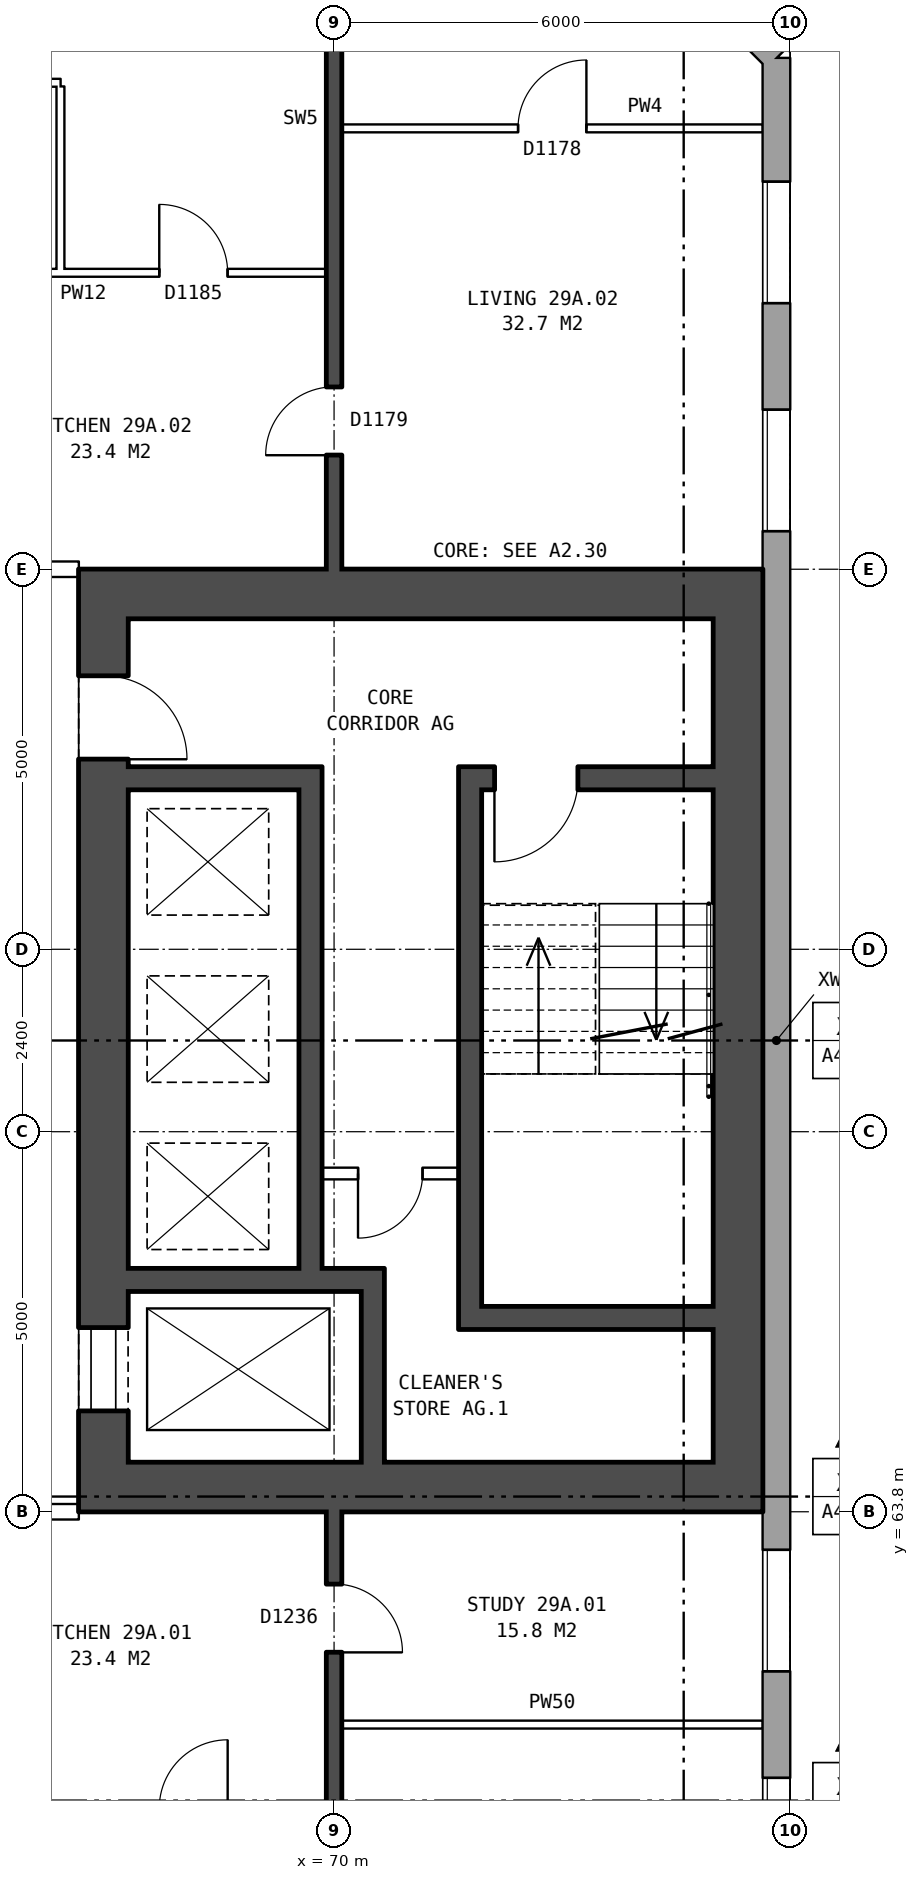
"""IFC4 building model, lengths in metres.
Left out: names, types, materials, properties, quantities, classifications, styles, units other than length and angle.
Written with IfcOpenShell. Run it as: python <this file> out.ifc"""

import sys

from ifc_helpers import new_model, si_unit, direction, frame, frame_2d, origin, place, context, subcontext, project, spatial, rectangle, extrude, element, fill, save


model = new_model("IFC4")
c1 = context("Model", 3, precision=1e-05, world=origin(), true_north=direction((0.0, 1.0)))
c2 = subcontext(c1, "Body", "Model", "MODEL_VIEW")
j1 = project(units=[si_unit("LENGTHUNIT", "METRE"), si_unit("PLANEANGLEUNIT", "RADIAN")], contexts=[c1])
p1 = place(None, origin())
s1 = spatial("IfcSite", under=j1, at=p1, CompositionType="ELEMENT")
p2 = place(p1, origin())
s2 = spatial("IfcBuilding", under=s1, at=p2, CompositionType="ELEMENT")
p3 = place(p2, frame((0.0, 0.0, 105.7)))
s3 = spatial("IfcBuildingStorey", under=s2, at=p3, CompositionType="ELEMENT", Elevation=105.7)
p4 = place(p3, frame((75.82, 57.075, 0.0), z_axis=(0.0, 0.0, 1.0), x_axis=(0.0, 1.0, 0.0)))
e1 = element("IfcWall", 1, at=p4, inside=s3, PredefinedType="STANDARD", context=c2, shape_type="SweptSolid", body=[
    extrude(rectangle(XDim=25.851, YDim=0.36, at=frame_2d((12.925, 0.0))), origin(), (0.0, 0.0, 1.0), 2.85),
])
p5 = place(p4, frame((1.625, 0.0, 0.8)))
e2 = element("IfcOpeningElement", 2, at=p5, cuts=e1, PredefinedType="OPENING", context=c2, shape_type="SweptSolid", body=[
    extrude(rectangle(XDim=1.6, YDim=1.8, at=frame_2d((0.8, 0.9))), frame((0.0, 0.19, 0.0), z_axis=(0.0, -1.0, 0.0), x_axis=(1.0, 0.0, 0.0)), (0.0, 0.0, 1.0), 0.38),
])
p6 = place(p4, frame((4.625, 0.0, 0.8)))
e3 = element("IfcOpeningElement", 3, at=p6, cuts=e1, PredefinedType="OPENING", context=c2, shape_type="SweptSolid", body=[
    extrude(rectangle(XDim=1.6, YDim=1.8, at=frame_2d((0.8, 0.9))), frame((0.0, 0.19, 0.0), z_axis=(0.0, -1.0, 0.0), x_axis=(1.0, 0.0, 0.0)), (0.0, 0.0, 1.0), 0.38),
])
p7 = place(p4, frame((19.625, 0.0, 0.8)))
e4 = element("IfcOpeningElement", 4, at=p7, cuts=e1, PredefinedType="OPENING", context=c2, shape_type="SweptSolid", body=[
    extrude(rectangle(XDim=1.6, YDim=1.8, at=frame_2d((0.8, 0.9))), frame((0.0, 0.19, 0.0), z_axis=(0.0, -1.0, 0.0), x_axis=(1.0, 0.0, 0.0)), (0.0, 0.0, 1.0), 0.38),
])
p8 = place(p4, frame((22.625, 0.0, 0.8)))
e5 = element("IfcOpeningElement", 5, at=p8, cuts=e1, PredefinedType="OPENING", context=c2, shape_type="SweptSolid", body=[
    extrude(rectangle(XDim=1.6, YDim=1.8, at=frame_2d((0.8, 0.9))), frame((0.0, 0.19, 0.0), z_axis=(0.0, -1.0, 0.0), x_axis=(1.0, 0.0, 0.0)), (0.0, 0.0, 1.0), 0.38),
])
p9 = place(p3, frame((75.82, 82.925, 0.0), z_axis=(0.0, 0.0, 1.0), x_axis=(-0.707106781187, 0.707106781187, 0.0)))
e6 = element("IfcWall", 6, at=p9, inside=s3, PredefinedType="STANDARD", context=c2, shape_type="SweptSolid", body=[
    extrude(rectangle(XDim=4.094, YDim=0.36, at=frame_2d((2.047, 0.0))), origin(), (0.0, 0.0, 1.0), 2.85),
])
p10 = place(p9, frame((1.247, 0.0, 0.8)))
e7 = element("IfcOpeningElement", 7, at=p10, cuts=e6, PredefinedType="OPENING", context=c2, shape_type="SweptSolid", body=[
    extrude(rectangle(XDim=1.6, YDim=1.8, at=frame_2d((0.8, 0.9))), frame((0.0, 0.19, 0.0), z_axis=(0.0, -1.0, 0.0), x_axis=(1.0, 0.0, 0.0)), (0.0, 0.0, 1.0), 0.38),
])
p11 = place(p3, frame((66.965, 64.45, 0.0), z_axis=(0.0, 0.0, 1.0), x_axis=(0.0, 1.0, 0.0)))
e8 = element("IfcWall", 8, at=p11, inside=s3, PredefinedType="SHEAR", context=c2, shape_type="SweptSolid", body=[
    extrude(rectangle(XDim=11.1, YDim=0.65, at=frame_2d((5.55, 0.0))), origin(), (0.0, 0.0, 1.0), 2.85),
])
p12 = place(p11, frame((0.675, 0.0, 0.0)))
e9 = element("IfcOpeningElement", 9, at=p12, cuts=e8, PredefinedType="OPENING", context=c2, shape_type="SweptSolid", body=[
    extrude(rectangle(XDim=1.1, YDim=2.1, at=frame_2d((0.55, 1.05))), frame((0.0, 0.335, 0.0), z_axis=(0.0, -1.0, 0.0), x_axis=(1.0, 0.0, 0.0)), (0.0, 0.0, 1.0), 0.67),
])
p13 = place(p11, frame((9.25, 0.0, 0.0)))
e10 = element("IfcOpeningElement", 10, at=p13, cuts=e8, PredefinedType="OPENING", context=c2, shape_type="SweptSolid", body=[
    extrude(rectangle(XDim=1.1, YDim=2.1, at=frame_2d((0.55, 1.05))), frame((0.0, 0.335, 0.0), z_axis=(0.0, -1.0, 0.0), x_axis=(1.0, 0.0, 0.0)), (0.0, 0.0, 1.0), 0.67),
])
p14 = place(p3, frame((75.315, 64.45, 0.0), z_axis=(0.0, 0.0, 1.0), x_axis=(0.0, 1.0, 0.0)))
e11 = element("IfcWall", 11, at=p14, inside=s3, PredefinedType="SHEAR", context=c2, shape_type="SweptSolid", body=[
    extrude(rectangle(XDim=11.1, YDim=0.65, at=frame_2d((5.55, 0.0))), origin(), (0.0, 0.0, 1.0), 2.85),
])
for number, where, z_axis, x_axis in (
    (12, (66.64, 64.125, 0.0), (0.0, 0.0, 1.0), (1.0, 0.0, 0.0)),
    (13, (66.64, 75.875, 0.0), (0.0, 0.0, 1.0), (1.0, 0.0, 0.0)),
):
    element("IfcWall", number, at=place(p3, frame(where, z_axis=z_axis, x_axis=x_axis)), inside=s3, PredefinedType="SHEAR", context=c2, shape_type="SweptSolid", body=[
        extrude(rectangle(XDim=9.0, YDim=0.65, at=frame_2d((4.5, 0.0))), origin(), (0.0, 0.0, 1.0), 2.85),
    ])
p15 = place(p3, frame((71.94, 66.35, 0.0), z_axis=(0.0, 0.0, 1.0), x_axis=(1.0, 0.0, 0.0)))
e14 = element("IfcWall", 14, at=p15, inside=s3, PredefinedType="SHEAR", context=c2, shape_type="SweptSolid", body=[
    extrude(rectangle(XDim=3.05, YDim=0.3, at=frame_2d((1.525, 0.0))), origin(), (0.0, 0.0, 1.0), 2.85),
])
p16 = place(p3, frame((67.29, 66.85, 0.0), z_axis=(0.0, 0.0, 1.0), x_axis=(1.0, 0.0, 0.0)))
e15 = element("IfcWall", 15, at=p16, inside=s3, PredefinedType="SHEAR", context=c2, shape_type="SweptSolid", body=[
    extrude(rectangle(XDim=3.37, YDim=0.3, at=frame_2d((1.685, 0.0))), origin(), (0.0, 0.0, 1.0), 2.85),
])
p17 = place(p3, frame((69.84, 68.25, 0.0), z_axis=(0.0, 0.0, 1.0), x_axis=(1.0, 0.0, 0.0)))
e16 = element("IfcWall", 16, at=p17, inside=s3, PredefinedType="PARTITIONING", context=c2, shape_type="SweptSolid", body=[
    extrude(rectangle(XDim=1.8, YDim=0.15, at=frame_2d((0.9, 0.0))), origin(), (0.0, 0.0, 1.0), 2.85),
])
p18 = place(p17, frame((0.475, 0.0, 0.0)))
e17 = element("IfcOpeningElement", 17, at=p18, cuts=e16, PredefinedType="OPENING", context=c2, shape_type="SweptSolid", body=[
    extrude(rectangle(XDim=0.85, YDim=2.1, at=frame_2d((0.425, 1.05))), frame((0.0, 0.085, 0.0), z_axis=(0.0, -1.0, 0.0), x_axis=(1.0, 0.0, 0.0)), (0.0, 0.0, 1.0), 0.17),
])
p19 = place(p3, frame((67.29, 73.45, 0.0), z_axis=(0.0, 0.0, 1.0), x_axis=(1.0, 0.0, 0.0)))
e18 = element("IfcWall", 18, at=p19, inside=s3, PredefinedType="SHEAR", context=c2, shape_type="SweptSolid", body=[
    extrude(rectangle(XDim=2.25, YDim=0.3, at=frame_2d((1.125, 0.0))), origin(), (0.0, 0.0, 1.0), 2.85),
])
p20 = place(p3, frame((71.94, 73.45, 0.0), z_axis=(0.0, 0.0, 1.0), x_axis=(1.0, 0.0, 0.0)))
e19 = element("IfcWall", 19, at=p20, inside=s3, PredefinedType="SHEAR", context=c2, shape_type="SweptSolid", body=[
    extrude(rectangle(XDim=3.05, YDim=0.3, at=frame_2d((1.525, 0.0))), origin(), (0.0, 0.0, 1.0), 2.85),
])
p21 = place(p20, frame((0.17, 0.0, 0.0)))
e20 = element("IfcOpeningElement", 20, at=p21, cuts=e19, PredefinedType="OPENING", context=c2, shape_type="SweptSolid", body=[
    extrude(rectangle(XDim=1.1, YDim=2.1, at=frame_2d((0.55, 1.05))), frame((0.0, 0.16, 0.0), z_axis=(0.0, -1.0, 0.0), x_axis=(1.0, 0.0, 0.0)), (0.0, 0.0, 1.0), 0.32),
])
p22 = place(p3, frame((69.69, 67.0, 0.0), z_axis=(0.0, 0.0, 1.0), x_axis=(0.0, 1.0, 0.0)))
e21 = element("IfcWall", 21, at=p22, inside=s3, PredefinedType="SHEAR", context=c2, shape_type="SweptSolid", body=[
    extrude(rectangle(XDim=6.6, YDim=0.3, at=frame_2d((3.3, 0.0))), origin(), (0.0, 0.0, 1.0), 2.85),
])
p23 = place(p3, frame((70.51, 64.45, 0.0), z_axis=(0.0, 0.0, 1.0), x_axis=(0.0, 1.0, 0.0)))
e22 = element("IfcWall", 22, at=p23, inside=s3, PredefinedType="SHEAR", context=c2, shape_type="SweptSolid", body=[
    extrude(rectangle(XDim=2.25, YDim=0.3, at=frame_2d((1.125, 0.0))), origin(), (0.0, 0.0, 1.0), 2.85),
])
p24 = place(p3, frame((71.79, 66.2, 0.0), z_axis=(0.0, 0.0, 1.0), x_axis=(0.0, 1.0, 0.0)))
e23 = element("IfcWall", 23, at=p24, inside=s3, PredefinedType="SHEAR", context=c2, shape_type="SweptSolid", body=[
    extrude(rectangle(XDim=7.4, YDim=0.3, at=frame_2d((3.7, 0.0))), origin(), (0.0, 0.0, 1.0), 2.85),
])
p25 = place(p3, frame((70.1, 61.0, 0.0), z_axis=(0.0, 0.0, 1.0), x_axis=(1.0, 0.0, 0.0)))
e24 = element("IfcWall", 24, at=p25, inside=s3, PredefinedType="PARTITIONING", context=c2, shape_type="SweptSolid", body=[
    extrude(rectangle(XDim=5.54, YDim=0.1, at=frame_2d((2.77, 0.0))), origin(), (0.0, 0.0, 1.0), 2.85),
])
p26 = place(p3, frame((63.64, 63.8, 0.0), z_axis=(0.0, 0.0, 1.0), x_axis=(1.0, 0.0, 0.0)))
e25 = element("IfcWall", 25, at=p26, inside=s3, PredefinedType="PARTITIONING", context=c2, shape_type="SweptSolid", body=[
    extrude(rectangle(XDim=3.0, YDim=0.2, at=frame_2d((1.5, 0.0))), origin(), (0.0, 0.0, 1.0), 2.85),
])
p27 = place(p26, frame((1.18, 0.0, 0.0)))
e26 = element("IfcOpeningElement", 26, at=p27, cuts=e25, PredefinedType="OPENING", context=c2, shape_type="SweptSolid", body=[
    extrude(rectangle(XDim=1.0, YDim=2.1, at=frame_2d((0.5, 1.05))), frame((0.0, 0.11, 0.0), z_axis=(0.0, -1.0, 0.0), x_axis=(1.0, 0.0, 0.0)), (0.0, 0.0, 1.0), 0.22),
])
p28 = place(p3, frame((63.64, 76.2, 0.0), z_axis=(0.0, 0.0, 1.0), x_axis=(1.0, 0.0, 0.0)))
e27 = element("IfcWall", 27, at=p28, inside=s3, PredefinedType="PARTITIONING", context=c2, shape_type="SweptSolid", body=[
    extrude(rectangle(XDim=3.0, YDim=0.2, at=frame_2d((1.5, 0.0))), origin(), (0.0, 0.0, 1.0), 2.85),
])
p29 = place(p28, frame((1.18, 0.0, 0.0)))
e28 = element("IfcOpeningElement", 28, at=p29, cuts=e27, PredefinedType="OPENING", context=c2, shape_type="SweptSolid", body=[
    extrude(rectangle(XDim=1.0, YDim=2.1, at=frame_2d((0.5, 1.05))), frame((0.0, 0.11, 0.0), z_axis=(0.0, -1.0, 0.0), x_axis=(1.0, 0.0, 0.0)), (0.0, 0.0, 1.0), 0.22),
])
p30 = place(p3, frame((64.1, 80.1, 0.0), z_axis=(0.0, 0.0, 1.0), x_axis=(1.0, 0.0, 0.0)))
e29 = element("IfcWall", 29, at=p30, inside=s3, PredefinedType="PARTITIONING", context=c2, shape_type="SweptSolid", body=[
    extrude(rectangle(XDim=5.8, YDim=0.1, at=frame_2d((2.9, 0.0))), origin(), (0.0, 0.0, 1.0), 2.85),
])
p31 = place(p30, frame((3.6, 0.0, 0.0)))
e30 = element("IfcOpeningElement", 30, at=p31, cuts=e29, PredefinedType="OPENING", context=c2, shape_type="SweptSolid", body=[
    extrude(rectangle(XDim=0.9, YDim=2.1, at=frame_2d((0.45, 1.05))), frame((0.0, 0.06, 0.0), z_axis=(0.0, -1.0, 0.0), x_axis=(1.0, 0.0, 0.0)), (0.0, 0.0, 1.0), 0.12),
])
p32 = place(p30, frame((0.7, 0.0, 0.0)))
e31 = element("IfcOpeningElement", 31, at=p32, cuts=e29, PredefinedType="OPENING", context=c2, shape_type="SweptSolid", body=[
    extrude(rectangle(XDim=0.9, YDim=2.1, at=frame_2d((0.45, 1.05))), frame((0.0, 0.06, 0.0), z_axis=(0.0, -1.0, 0.0), x_axis=(1.0, 0.0, 0.0)), (0.0, 0.0, 1.0), 0.12),
])
p33 = place(p3, frame((70.1, 82.0, 0.0), z_axis=(0.0, 0.0, 1.0), x_axis=(1.0, 0.0, 0.0)))
e32 = element("IfcWall", 32, at=p33, inside=s3, PredefinedType="PARTITIONING", context=c2, shape_type="SweptSolid", body=[
    extrude(rectangle(XDim=5.54, YDim=0.1, at=frame_2d((2.77, 0.0))), origin(), (0.0, 0.0, 1.0), 2.85),
])
p34 = place(p33, frame((2.32, 0.0, 0.0)))
e33 = element("IfcOpeningElement", 33, at=p34, cuts=e32, PredefinedType="OPENING", context=c2, shape_type="SweptSolid", body=[
    extrude(rectangle(XDim=0.9, YDim=2.1, at=frame_2d((0.45, 1.05))), frame((0.0, 0.06, 0.0), z_axis=(0.0, -1.0, 0.0), x_axis=(1.0, 0.0, 0.0)), (0.0, 0.0, 1.0), 0.12),
])
p35 = place(p3, frame((64.1, 82.6, 0.0), z_axis=(0.0, 0.0, 1.0), x_axis=(1.0, 0.0, 0.0)))
e34 = element("IfcWall", 34, at=p35, inside=s3, PredefinedType="PARTITIONING", context=c2, shape_type="SweptSolid", body=[
    extrude(rectangle(XDim=2.3, YDim=0.1, at=frame_2d((1.15, 0.0))), origin(), (0.0, 0.0, 1.0), 2.85),
])
p36 = place(p3, frame((66.4, 80.15, 0.0), z_axis=(0.0, 0.0, 1.0), x_axis=(0.0, 1.0, 0.0)))
e35 = element("IfcWall", 35, at=p36, inside=s3, PredefinedType="PARTITIONING", context=c2, shape_type="SweptSolid", body=[
    extrude(rectangle(XDim=2.4, YDim=0.1, at=frame_2d((1.2, 0.0))), origin(), (0.0, 0.0, 1.0), 2.85),
])
p37 = place(p3, frame((70.0, 54.36, 0.0), z_axis=(0.0, 0.0, 1.0), x_axis=(0.0, 1.0, 0.0)))
e36 = element("IfcWall", 36, at=p37, inside=s3, PredefinedType="SOLIDWALL", context=c2, shape_type="SweptSolid", body=[
    extrude(rectangle(XDim=9.44, YDim=0.2, at=frame_2d((4.72, 0.0))), origin(), (0.0, 0.0, 1.0), 2.85),
])
p38 = place(p37, frame((2.32, 0.0, 0.0)))
e37 = element("IfcOpeningElement", 37, at=p38, cuts=e36, PredefinedType="OPENING", context=c2, shape_type="SweptSolid", body=[
    extrude(rectangle(XDim=0.9, YDim=2.1, at=frame_2d((0.45, 1.05))), frame((0.0, 0.11, 0.0), z_axis=(0.0, -1.0, 0.0), x_axis=(1.0, 0.0, 0.0)), (0.0, 0.0, 1.0), 0.22),
])
p39 = place(p37, frame((7.59, 0.0, 0.0)))
e38 = element("IfcOpeningElement", 38, at=p39, cuts=e36, PredefinedType="OPENING", context=c2, shape_type="SweptSolid", body=[
    extrude(rectangle(XDim=0.9, YDim=2.1, at=frame_2d((0.45, 1.05))), frame((0.0, 0.11, 0.0), z_axis=(0.0, -1.0, 0.0), x_axis=(1.0, 0.0, 0.0)), (0.0, 0.0, 1.0), 0.22),
])
p40 = place(p3, frame((70.0, 76.2, 0.0), z_axis=(0.0, 0.0, 1.0), x_axis=(0.0, 1.0, 0.0)))
e39 = element("IfcWall", 39, at=p40, inside=s3, PredefinedType="SOLIDWALL", context=c2, shape_type="SweptSolid", body=[
    extrude(rectangle(XDim=9.44, YDim=0.2, at=frame_2d((4.72, 0.0))), origin(), (0.0, 0.0, 1.0), 2.85),
])
p41 = place(p40, frame((1.5, 0.0, 0.0)))
e40 = element("IfcOpeningElement", 40, at=p41, cuts=e39, PredefinedType="OPENING", context=c2, shape_type="SweptSolid", body=[
    extrude(rectangle(XDim=0.9, YDim=2.1, at=frame_2d((0.45, 1.05))), frame((0.0, 0.11, 0.0), z_axis=(0.0, -1.0, 0.0), x_axis=(1.0, 0.0, 0.0)), (0.0, 0.0, 1.0), 0.22),
])
p42 = place(p5, origin())
e41 = element("IfcWindow", 41, at=p42, inside=s3, PartitioningType="SINGLE_PANEL", PredefinedType="WINDOW", context=c2, shape_type="SweptSolid", body=[
    extrude(rectangle(XDim=1.6, YDim=1.8, at=frame_2d((0.8, 0.9))), frame((0.0, 0.15, 0.0), z_axis=(0.0, -1.0, 0.0), x_axis=(1.0, 0.0, 0.0)), (0.0, 0.0, 1.0), 0.06),
])
fill(e2, e41)
p43 = place(p6, origin())
e42 = element("IfcWindow", 42, at=p43, inside=s3, PartitioningType="SINGLE_PANEL", PredefinedType="WINDOW", context=c2, shape_type="SweptSolid", body=[
    extrude(rectangle(XDim=1.6, YDim=1.8, at=frame_2d((0.8, 0.9))), frame((0.0, 0.15, 0.0), z_axis=(0.0, -1.0, 0.0), x_axis=(1.0, 0.0, 0.0)), (0.0, 0.0, 1.0), 0.06),
])
fill(e3, e42)
p44 = place(p7, origin())
e43 = element("IfcWindow", 43, at=p44, inside=s3, PartitioningType="SINGLE_PANEL", PredefinedType="WINDOW", context=c2, shape_type="SweptSolid", body=[
    extrude(rectangle(XDim=1.6, YDim=1.8, at=frame_2d((0.8, 0.9))), frame((0.0, 0.15, 0.0), z_axis=(0.0, -1.0, 0.0), x_axis=(1.0, 0.0, 0.0)), (0.0, 0.0, 1.0), 0.06),
])
fill(e4, e43)
p45 = place(p8, origin())
e44 = element("IfcWindow", 44, at=p45, inside=s3, PartitioningType="SINGLE_PANEL", PredefinedType="WINDOW", context=c2, shape_type="SweptSolid", body=[
    extrude(rectangle(XDim=1.6, YDim=1.8, at=frame_2d((0.8, 0.9))), frame((0.0, 0.15, 0.0), z_axis=(0.0, -1.0, 0.0), x_axis=(1.0, 0.0, 0.0)), (0.0, 0.0, 1.0), 0.06),
])
fill(e5, e44)
p46 = place(p12, origin())
e45 = element("IfcDoor", 45, at=p46, inside=s3, OperationType="DOUBLE_DOOR_SLIDING", PredefinedType="DOOR", context=c2, shape_type="SweptSolid", body=[
    extrude(rectangle(XDim=1.1, YDim=2.1, at=frame_2d((0.55, 1.05))), frame((0.0, -0.26, 0.0), z_axis=(0.0, -1.0, 0.0), x_axis=(1.0, 0.0, 0.0)), (0.0, 0.0, 1.0), 0.05),
])
fill(e9, e45)
p47 = place(p13, frame((1.1, 0.0, 0.0), z_axis=(0.0, 0.0, 1.0), x_axis=(-1.0, 0.0, 0.0)))
e46 = element("IfcDoor", 46, at=p47, inside=s3, OperationType="SINGLE_SWING_RIGHT", PredefinedType="DOOR", context=c2, shape_type="SweptSolid", body=[
    extrude(rectangle(XDim=1.1, YDim=2.1, at=frame_2d((0.55, 1.05))), frame((0.0, 0.31, 0.0), z_axis=(0.0, -1.0, 0.0), x_axis=(1.0, 0.0, 0.0)), (0.0, 0.0, 1.0), 0.05),
])
fill(e10, e46)
p48 = place(p21, frame((1.1, 0.0, 0.0), z_axis=(0.0, 0.0, 1.0), x_axis=(-1.0, 0.0, 0.0)))
e47 = element("IfcDoor", 47, at=p48, inside=s3, OperationType="SINGLE_SWING_RIGHT", PredefinedType="DOOR", context=c2, shape_type="SweptSolid", body=[
    extrude(rectangle(XDim=1.1, YDim=2.1, at=frame_2d((0.55, 1.05))), frame((0.0, 0.025, 0.0), z_axis=(0.0, -1.0, 0.0), x_axis=(1.0, 0.0, 0.0)), (0.0, 0.0, 1.0), 0.05),
])
fill(e20, e47)
p49 = place(p18, frame((0.85, 0.0, 0.0), z_axis=(0.0, 0.0, 1.0), x_axis=(-1.0, 0.0, 0.0)))
e48 = element("IfcDoor", 48, at=p49, inside=s3, OperationType="SINGLE_SWING_RIGHT", PredefinedType="DOOR", context=c2, shape_type="SweptSolid", body=[
    extrude(rectangle(XDim=0.85, YDim=2.1, at=frame_2d((0.425, 1.05))), frame((0.0, 0.025, 0.0), z_axis=(0.0, -1.0, 0.0), x_axis=(1.0, 0.0, 0.0)), (0.0, 0.0, 1.0), 0.05),
])
fill(e17, e48)
p50 = place(p39, frame((0.9, 0.0, 0.0), z_axis=(0.0, 0.0, 1.0), x_axis=(-1.0, 0.0, 0.0)))
e49 = element("IfcDoor", 49, at=p50, inside=s3, OperationType="SINGLE_SWING_RIGHT", PredefinedType="DOOR", context=c2, shape_type="SweptSolid", body=[
    extrude(rectangle(XDim=0.9, YDim=2.1, at=frame_2d((0.45, 1.05))), frame((0.0, 0.025, 0.0), z_axis=(0.0, -1.0, 0.0), x_axis=(1.0, 0.0, 0.0)), (0.0, 0.0, 1.0), 0.05),
])
fill(e38, e49)
p51 = place(p31, origin())
e50 = element("IfcDoor", 50, at=p51, inside=s3, OperationType="SINGLE_SWING_LEFT", PredefinedType="DOOR", context=c2, shape_type="SweptSolid", body=[
    extrude(rectangle(XDim=0.9, YDim=2.1, at=frame_2d((0.45, 1.05))), frame((0.0, 0.025, 0.0), z_axis=(0.0, -1.0, 0.0), x_axis=(1.0, 0.0, 0.0)), (0.0, 0.0, 1.0), 0.05),
])
fill(e30, e50)
p52 = place(p34, origin())
e51 = element("IfcDoor", 51, at=p52, inside=s3, OperationType="SINGLE_SWING_RIGHT", PredefinedType="DOOR", context=c2, shape_type="SweptSolid", body=[
    extrude(rectangle(XDim=0.9, YDim=2.1, at=frame_2d((0.45, 1.05))), frame((0.0, 0.025, 0.0), z_axis=(0.0, -1.0, 0.0), x_axis=(1.0, 0.0, 0.0)), (0.0, 0.0, 1.0), 0.05),
])
fill(e33, e51)
p53 = place(p41, origin())
e52 = element("IfcDoor", 52, at=p53, inside=s3, OperationType="SINGLE_SWING_LEFT", PredefinedType="DOOR", context=c2, shape_type="SweptSolid", body=[
    extrude(rectangle(XDim=0.9, YDim=2.1, at=frame_2d((0.45, 1.05))), frame((0.0, 0.025, 0.0), z_axis=(0.0, -1.0, 0.0), x_axis=(1.0, 0.0, 0.0)), (0.0, 0.0, 1.0), 0.05),
])
fill(e40, e52)
save(model, sys.argv[1])
